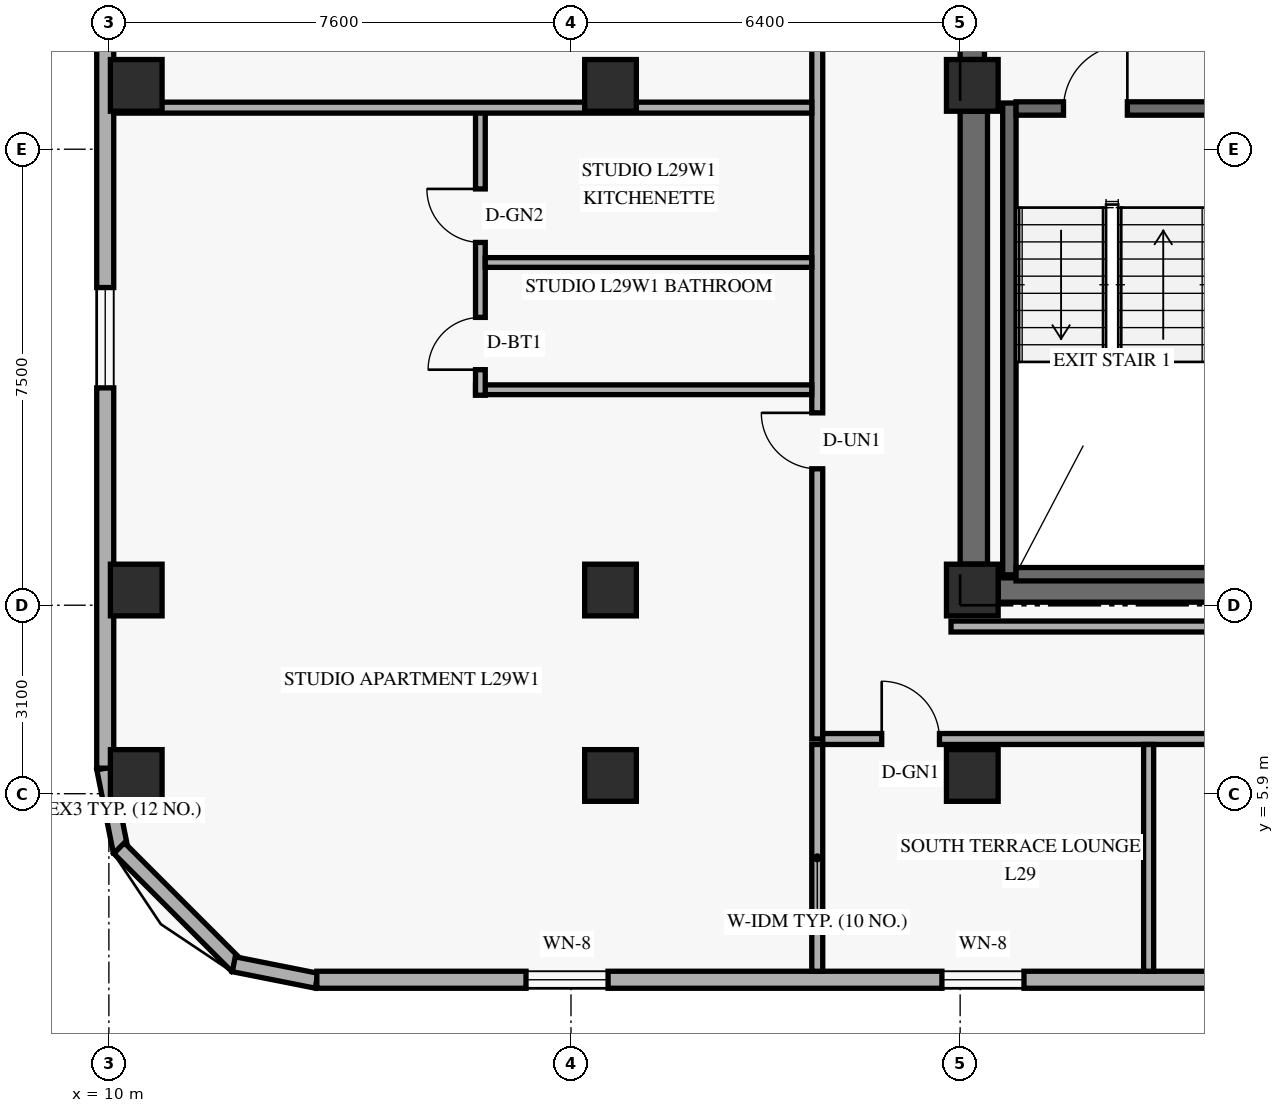
"""IFC4 building model, lengths in metres.
Left out: names, types, materials, properties, quantities, classifications, styles, units other than length and angle.
Written with IfcOpenShell. Run it as: python <this file> out.ifc"""

import sys

from ifc_helpers import new_model, si_unit, direction, frame, frame_2d, origin, origin_2d, place, context, subcontext, project, spatial, rectangle, extrude, element, fill, save


model = new_model("IFC4")
c1 = context("Model", 3, precision=1e-05, world=origin(), true_north=direction((0.0, 1.0)))
c2 = subcontext(c1, "Body", "Model", "MODEL_VIEW")
j1 = project(units=[si_unit("LENGTHUNIT", "METRE"), si_unit("PLANEANGLEUNIT", "RADIAN")], contexts=[c1])
p1 = place(None, origin())
s1 = spatial("IfcSite", under=j1, at=p1, CompositionType="ELEMENT")
p2 = place(p1, origin())
s2 = spatial("IfcBuilding", under=s1, at=p2, CompositionType="ELEMENT")
p3 = place(p2, frame((0.0, 0.0, 113.4)))
s3 = spatial("IfcBuildingStorey", under=s2, at=p3, CompositionType="ELEMENT", Elevation=113.4)
p4 = place(p3, frame((24.225, 9.675, 0.0), z_axis=(0.0, 0.0, 1.0), x_axis=(0.0, 1.0, 0.0)))
e1 = element("IfcWall", 1, at=p4, inside=s3, PredefinedType="SHEAR", context=c2, shape_type="SweptSolid", body=[
    extrude(rectangle(XDim=7.45, YDim=0.45, at=frame_2d((3.725, 0.0))), origin(), (0.0, 0.0, 1.0), 2.739),
])
p5 = place(p3, frame((24.2, 17.975, 0.0), z_axis=(0.0, 0.0, 1.0), x_axis=(0.0, 1.0, 0.0)))
e2 = element("IfcWall", 2, at=p5, inside=s3, PredefinedType="SHEAR", context=c2, shape_type="SweptSolid", body=[
    extrude(rectangle(XDim=11.8, YDim=0.4, at=frame_2d((5.9, 0.0))), origin(), (0.0, 0.0, 1.0), 2.739),
])
p6 = place(p3, frame((24.625, 9.25, 0.0), z_axis=(0.0, 0.0, 1.0), x_axis=(1.0, 0.0, 0.0)))
e3 = element("IfcWall", 3, at=p6, inside=s3, PredefinedType="SHEAR", context=c2, shape_type="SweptSolid", body=[
    extrude(rectangle(XDim=10.15, YDim=0.4, at=frame_2d((5.075, 0.0))), origin(), (0.0, 0.0, 1.0), 3.35),
])
p7 = place(p6, frame((5.2, 0.0, 0.0)))
e4 = element("IfcOpeningElement", 4, at=p7, cuts=e3, PredefinedType="OPENING", context=c2, shape_type="SweptSolid", body=[
    extrude(rectangle(XDim=1.05, YDim=2.15, at=frame_2d((0.525, 1.075))), frame((0.0, 0.21, 0.0), z_axis=(0.0, -1.0, 0.0), x_axis=(1.0, 0.0, 0.0)), (0.0, 0.0, 1.0), 0.42),
])
p8 = place(p3, frame((24.81, 9.5, 0.0), z_axis=(0.0, 0.0, 1.0), x_axis=(0.0, 1.0, 0.0)))
e5 = element("IfcWall", 5, at=p8, inside=s3, PredefinedType="SHEAR", context=c2, shape_type="SweptSolid", body=[
    extrude(rectangle(XDim=7.76, YDim=0.22, at=frame_2d((3.88, 0.0))), origin(), (0.0, 0.0, 1.0), 3.35),
])
p9 = place(p3, frame((24.92, 9.51, 0.0), z_axis=(0.0, 0.0, 1.0), x_axis=(1.0, 0.0, 0.0)))
e6 = element("IfcWall", 6, at=p9, inside=s3, PredefinedType="SHEAR", context=c2, shape_type="SweptSolid", body=[
    extrude(rectangle(XDim=3.16, YDim=0.22, at=frame_2d((1.58, 0.0))), origin(), (0.0, 0.0, 1.0), 3.35),
])
p10 = place(p3, frame((24.92, 17.17, 0.0), z_axis=(0.0, 0.0, 1.0), x_axis=(1.0, 0.0, 0.0)))
e7 = element("IfcWall", 7, at=p10, inside=s3, PredefinedType="SHEAR", context=c2, shape_type="SweptSolid", body=[
    extrude(rectangle(XDim=3.16, YDim=0.22, at=frame_2d((1.58, 0.0))), origin(), (0.0, 0.0, 1.0), 3.35),
])
p11 = place(p10, frame((0.78, 0.0, 0.0)))
e8 = element("IfcOpeningElement", 8, at=p11, cuts=e7, PredefinedType="OPENING", context=c2, shape_type="SweptSolid", body=[
    extrude(rectangle(XDim=1.05, YDim=2.15, at=frame_2d((0.525, 1.075))), frame((0.0, 0.12, 0.0), z_axis=(0.0, -1.0, 0.0), x_axis=(1.0, 0.0, 0.0)), (0.0, 0.0, 1.0), 0.24),
])
for number, where, z_axis, x_axis in (
    (9, (10.45, 6.2, 0.0), (0.0, 0.0, 1.0), (1.0, 0.0, 0.0)),
    (10, (10.45, 9.25, 0.0), (0.0, 0.0, 1.0), (1.0, 0.0, 0.0)),
    (11, (10.45, 17.55, 0.0), (0.0, 0.0, 1.0), (1.0, 0.0, 0.0)),
    (12, (18.25, 6.2, 0.0), (0.0, 0.0, 1.0), (1.0, 0.0, 0.0)),
    (13, (18.25, 9.25, 0.0), (0.0, 0.0, 1.0), (1.0, 0.0, 0.0)),
    (14, (18.25, 17.55, 0.0), (0.0, 0.0, 1.0), (1.0, 0.0, 0.0)),
    (15, (24.2, 6.2, 0.0), (0.0, 0.0, 1.0), (1.0, 0.0, 0.0)),
    (16, (24.2, 9.25, 0.0), (0.0, 0.0, 1.0), (1.0, 0.0, 0.0)),
    (17, (24.2, 17.55, 0.0), (0.0, 0.0, 1.0), (1.0, 0.0, 0.0)),
):
    element("IfcColumn", number, at=place(p3, frame(where, z_axis=z_axis, x_axis=x_axis)), inside=s3, PredefinedType="COLUMN", context=c2, shape_type="SweptSolid", body=[
        extrude(rectangle(XDim=0.85, YDim=0.85, at=origin_2d()), origin(), (0.0, 0.0, 1.0), 3.6),
    ])
p12 = place(p3, frame((9.924, 6.316, 0.0), z_axis=(0.0, 0.0, 1.0), x_axis=(0.195000137217, -0.980803214965, 0.0)))
e18 = element("IfcWall", 18, at=p12, inside=s3, PredefinedType="SOLIDWALL", context=c2, shape_type="SweptSolid", body=[
    extrude(rectangle(XDim=1.388, YDim=0.25, at=frame_2d((0.694, 0.0))), origin(), (0.0, 0.0, 1.0), 3.35),
])
p13 = place(p3, frame((10.168, 5.005, 0.0), z_axis=(0.0, 0.0, 1.0), x_axis=(0.707151344399, -0.707062215165, 0.0)))
e19 = element("IfcWall", 19, at=p13, inside=s3, PredefinedType="SOLIDWALL", context=c2, shape_type="SweptSolid", body=[
    extrude(rectangle(XDim=2.739, YDim=0.25, at=frame_2d((1.37, 0.0))), origin(), (0.0, 0.0, 1.0), 3.35),
])
p14 = place(p3, frame((12.054, 3.095, 0.0), z_axis=(0.0, 0.0, 1.0), x_axis=(0.980809899341, -0.19496651342, 0.0)))
e20 = element("IfcWall", 20, at=p14, inside=s3, PredefinedType="SOLIDWALL", context=c2, shape_type="SweptSolid", body=[
    extrude(rectangle(XDim=1.389, YDim=0.25, at=frame_2d((0.694, 0.0))), origin(), (0.0, 0.0, 1.0), 3.35),
])
p15 = place(p3, frame((13.42, 2.84, 0.0), z_axis=(0.0, 0.0, 1.0), x_axis=(1.0, 0.0, 0.0)))
e21 = element("IfcWall", 21, at=p15, inside=s3, PredefinedType="SOLIDWALL", context=c2, shape_type="SweptSolid", body=[
    extrude(rectangle(XDim=36.56, YDim=0.28, at=frame_2d((18.28, 0.0))), origin(), (0.0, 0.0, 1.0), 3.35),
])
p16 = place(p15, frame((3.44, 0.0, 0.85)))
e22 = element("IfcOpeningElement", 22, at=p16, cuts=e21, PredefinedType="OPENING", context=c2, shape_type="SweptSolid", body=[
    extrude(rectangle(XDim=1.35, YDim=1.55, at=frame_2d((0.675, 0.775))), frame((0.0, 0.15, 0.0), z_axis=(0.0, -1.0, 0.0), x_axis=(1.0, 0.0, 0.0)), (0.0, 0.0, 1.0), 0.3),
])
p17 = place(p15, frame((10.28, 0.0, 0.85)))
e23 = element("IfcOpeningElement", 23, at=p17, cuts=e21, PredefinedType="OPENING", context=c2, shape_type="SweptSolid", body=[
    extrude(rectangle(XDim=1.35, YDim=1.55, at=frame_2d((0.675, 0.775))), frame((0.0, 0.15, 0.0), z_axis=(0.0, -1.0, 0.0), x_axis=(1.0, 0.0, 0.0)), (0.0, 0.0, 1.0), 0.3),
])
p18 = place(p15, frame((17.165, 0.0, 0.85)))
e24 = element("IfcOpeningElement", 24, at=p18, cuts=e21, PredefinedType="OPENING", context=c2, shape_type="SweptSolid", body=[
    extrude(rectangle(XDim=1.35, YDim=1.55, at=frame_2d((0.675, 0.775))), frame((0.0, 0.15, 0.0), z_axis=(0.0, -1.0, 0.0), x_axis=(1.0, 0.0, 0.0)), (0.0, 0.0, 1.0), 0.3),
])
p19 = place(p15, frame((22.59, 0.0, 0.85)))
e25 = element("IfcOpeningElement", 25, at=p19, cuts=e21, PredefinedType="OPENING", context=c2, shape_type="SweptSolid", body=[
    extrude(rectangle(XDim=1.35, YDim=1.55, at=frame_2d((0.675, 0.775))), frame((0.0, 0.15, 0.0), z_axis=(0.0, -1.0, 0.0), x_axis=(1.0, 0.0, 0.0)), (0.0, 0.0, 1.0), 0.3),
])
p20 = place(p15, frame((27.68, 0.0, 0.85)))
e26 = element("IfcOpeningElement", 26, at=p20, cuts=e21, PredefinedType="OPENING", context=c2, shape_type="SweptSolid", body=[
    extrude(rectangle(XDim=1.35, YDim=1.55, at=frame_2d((0.675, 0.775))), frame((0.0, 0.15, 0.0), z_axis=(0.0, -1.0, 0.0), x_axis=(1.0, 0.0, 0.0)), (0.0, 0.0, 1.0), 0.3),
])
p21 = place(p15, frame((32.48, 0.0, 0.85)))
e27 = element("IfcOpeningElement", 27, at=p21, cuts=e21, PredefinedType="OPENING", context=c2, shape_type="SweptSolid", body=[
    extrude(rectangle(XDim=1.2, YDim=1.5, at=frame_2d((0.6, 0.75))), frame((0.0, 0.15, 0.0), z_axis=(0.0, -1.0, 0.0), x_axis=(1.0, 0.0, 0.0)), (0.0, 0.0, 1.0), 0.3),
])
p22 = place(p15, frame((34.595, 0.0, 0.85)))
e28 = element("IfcOpeningElement", 28, at=p22, cuts=e21, PredefinedType="OPENING", context=c2, shape_type="SweptSolid", body=[
    extrude(rectangle(XDim=1.35, YDim=1.55, at=frame_2d((0.675, 0.775))), frame((0.0, 0.15, 0.0), z_axis=(0.0, -1.0, 0.0), x_axis=(1.0, 0.0, 0.0)), (0.0, 0.0, 1.0), 0.3),
])
p23 = place(p3, frame((9.94, 41.68, 0.0), z_axis=(0.0, 0.0, 1.0), x_axis=(0.0, -1.0, 0.0)))
e29 = element("IfcWall", 29, at=p23, inside=s3, PredefinedType="SOLIDWALL", context=c2, shape_type="SweptSolid", body=[
    extrude(rectangle(XDim=35.36, YDim=0.28, at=frame_2d((17.68, 0.0))), origin(), (0.0, 0.0, 1.0), 3.35),
])
p24 = place(p23, frame((27.455, 0.0, 0.85)))
e30 = element("IfcOpeningElement", 30, at=p24, cuts=e29, PredefinedType="OPENING", context=c2, shape_type="SweptSolid", body=[
    extrude(rectangle(XDim=1.65, YDim=1.6, at=frame_2d((0.825, 0.8))), frame((0.0, 0.15, 0.0), z_axis=(0.0, -1.0, 0.0), x_axis=(1.0, 0.0, 0.0)), (0.0, 0.0, 1.0), 0.3),
])
p25 = place(p23, frame((21.286, 0.0, 0.85)))
e31 = element("IfcOpeningElement", 31, at=p25, cuts=e29, PredefinedType="OPENING", context=c2, shape_type="SweptSolid", body=[
    extrude(rectangle(XDim=1.65, YDim=1.6, at=frame_2d((0.825, 0.8))), frame((0.0, 0.15, 0.0), z_axis=(0.0, -1.0, 0.0), x_axis=(1.0, 0.0, 0.0)), (0.0, 0.0, 1.0), 0.3),
])
p26 = place(p23, frame((16.267, 0.0, 0.85)))
e32 = element("IfcOpeningElement", 32, at=p26, cuts=e29, PredefinedType="OPENING", context=c2, shape_type="SweptSolid", body=[
    extrude(rectangle(XDim=1.65, YDim=1.6, at=frame_2d((0.825, 0.8))), frame((0.0, 0.15, 0.0), z_axis=(0.0, -1.0, 0.0), x_axis=(1.0, 0.0, 0.0)), (0.0, 0.0, 1.0), 0.3),
])
p27 = place(p23, frame((12.186, 0.0, 0.85)))
e33 = element("IfcOpeningElement", 33, at=p27, cuts=e29, PredefinedType="OPENING", context=c2, shape_type="SweptSolid", body=[
    extrude(rectangle(XDim=1.2, YDim=1.5, at=frame_2d((0.6, 0.75))), frame((0.0, 0.15, 0.0), z_axis=(0.0, -1.0, 0.0), x_axis=(1.0, 0.0, 0.0)), (0.0, 0.0, 1.0), 0.3),
])
p28 = place(p23, frame((6.242, 0.0, 0.85)))
e34 = element("IfcOpeningElement", 34, at=p28, cuts=e29, PredefinedType="OPENING", context=c2, shape_type="SweptSolid", body=[
    extrude(rectangle(XDim=1.65, YDim=1.6, at=frame_2d((0.825, 0.8))), frame((0.0, 0.15, 0.0), z_axis=(0.0, -1.0, 0.0), x_axis=(1.0, 0.0, 0.0)), (0.0, 0.0, 1.0), 0.3),
])
p29 = place(p23, frame((0.58, 0.0, 0.85)))
e35 = element("IfcOpeningElement", 35, at=p29, cuts=e29, PredefinedType="OPENING", context=c2, shape_type="SweptSolid", body=[
    extrude(rectangle(XDim=1.65, YDim=1.6, at=frame_2d((0.825, 0.8))), frame((0.0, 0.15, 0.0), z_axis=(0.0, -1.0, 0.0), x_axis=(1.0, 0.0, 0.0)), (0.0, 0.0, 1.0), 0.3),
])
p30 = place(p3, frame((21.65, 6.8, 0.0), z_axis=(0.0, 0.0, 1.0), x_axis=(0.0, 1.0, 0.0)))
e36 = element("IfcWall", 36, at=p30, inside=s3, PredefinedType="STANDARD", context=c2, shape_type="SweptSolid", body=[
    extrude(rectangle(XDim=34.4, YDim=0.18, at=frame_2d((17.2, 0.0))), origin(), (0.0, 0.0, 1.0), 2.721),
])
p31 = place(p30, frame((4.444, 0.0, 0.0)))
e37 = element("IfcOpeningElement", 37, at=p31, cuts=e36, PredefinedType="OPENING", context=c2, shape_type="SweptSolid", body=[
    extrude(rectangle(XDim=0.92, YDim=2.15, at=frame_2d((0.46, 1.075))), frame((0.0, 0.1, 0.0), z_axis=(0.0, -1.0, 0.0), x_axis=(1.0, 0.0, 0.0)), (0.0, 0.0, 1.0), 0.2),
])
p32 = place(p30, frame((15.192, 0.0, 0.0)))
e38 = element("IfcOpeningElement", 38, at=p32, cuts=e36, PredefinedType="OPENING", context=c2, shape_type="SweptSolid", body=[
    extrude(rectangle(XDim=0.92, YDim=2.15, at=frame_2d((0.46, 1.075))), frame((0.0, 0.1, 0.0), z_axis=(0.0, -1.0, 0.0), x_axis=(1.0, 0.0, 0.0)), (0.0, 0.0, 1.0), 0.2),
])
p33 = place(p30, frame((29.868, 0.0, 0.0)))
e39 = element("IfcOpeningElement", 39, at=p33, cuts=e36, PredefinedType="OPENING", context=c2, shape_type="SweptSolid", body=[
    extrude(rectangle(XDim=0.92, YDim=2.15, at=frame_2d((0.46, 1.075))), frame((0.0, 0.1, 0.0), z_axis=(0.0, -1.0, 0.0), x_axis=(1.0, 0.0, 0.0)), (0.0, 0.0, 1.0), 0.2),
])
p34 = place(p3, frame((21.74, 6.8, 0.0), z_axis=(0.0, 0.0, 1.0), x_axis=(1.0, 0.0, 0.0)))
e40 = element("IfcWall", 40, at=p34, inside=s3, PredefinedType="STANDARD", context=c2, shape_type="SweptSolid", body=[
    extrude(rectangle(XDim=13.68, YDim=0.18, at=frame_2d((6.84, 0.0))), origin(), (0.0, 0.0, 1.0), 2.721),
])
p35 = place(p34, frame((0.97, 0.0, 0.0)))
e41 = element("IfcOpeningElement", 41, at=p35, cuts=e40, PredefinedType="OPENING", context=c2, shape_type="SweptSolid", body=[
    extrude(rectangle(XDim=0.95, YDim=2.15, at=frame_2d((0.475, 1.075))), frame((0.0, 0.1, 0.0), z_axis=(0.0, -1.0, 0.0), x_axis=(1.0, 0.0, 0.0)), (0.0, 0.0, 1.0), 0.2),
])
p36 = place(p34, frame((9.11, 0.0, 0.0)))
e42 = element("IfcOpeningElement", 42, at=p36, cuts=e40, PredefinedType="OPENING", context=c2, shape_type="SweptSolid", body=[
    extrude(rectangle(XDim=0.95, YDim=2.15, at=frame_2d((0.475, 1.075))), frame((0.0, 0.1, 0.0), z_axis=(0.0, -1.0, 0.0), x_axis=(1.0, 0.0, 0.0)), (0.0, 0.0, 1.0), 0.2),
])
p37 = place(p3, frame((23.85, 8.65, 0.0), z_axis=(0.0, 0.0, 1.0), x_axis=(1.0, 0.0, 0.0)))
e43 = element("IfcWall", 43, at=p37, inside=s3, PredefinedType="STANDARD", context=c2, shape_type="SweptSolid", body=[
    extrude(rectangle(XDim=11.57, YDim=0.18, at=frame_2d((5.785, 0.0))), origin(), (0.0, 0.0, 1.0), 2.721),
])
p38 = place(p3, frame((21.65, 2.98, 0.0), z_axis=(0.0, 0.0, 1.0), x_axis=(0.0, 1.0, 0.0)))
e44 = element("IfcWall", 44, at=p38, inside=s3, PredefinedType="PARTITIONING", context=c2, shape_type="SweptSolid", body=[
    extrude(rectangle(XDim=3.73, YDim=0.18, at=frame_2d((1.865, 0.0))), origin(), (0.0, 0.0, 1.0), 2.799),
])
p39 = place(p3, frame((16.03, 12.544, 0.0), z_axis=(0.0, 0.0, 1.0), x_axis=(1.0, 0.0, 0.0)))
e45 = element("IfcWall", 45, at=p39, inside=s3, PredefinedType="PLUMBINGWALL", context=c2, shape_type="SweptSolid", body=[
    extrude(rectangle(XDim=5.53, YDim=0.16, at=frame_2d((2.765, 0.0))), origin(), (0.0, 0.0, 1.0), 2.721),
])
p40 = place(p3, frame((16.11, 12.454, 0.0), z_axis=(0.0, 0.0, 1.0), x_axis=(0.0, 1.0, 0.0)))
e46 = element("IfcWall", 46, at=p40, inside=s3, PredefinedType="PLUMBINGWALL", context=c2, shape_type="SweptSolid", body=[
    extrude(rectangle(XDim=4.73, YDim=0.16, at=frame_2d((2.365, 0.0))), origin(), (0.0, 0.0, 1.0), 2.978),
])
p41 = place(p40, frame((0.42, 0.0, 0.0)))
e47 = element("IfcOpeningElement", 47, at=p41, cuts=e46, PredefinedType="OPENING", context=c2, shape_type="SweptSolid", body=[
    extrude(rectangle(XDim=0.86, YDim=2.12, at=frame_2d((0.43, 1.06))), frame((0.0, 0.09, 0.0), z_axis=(0.0, -1.0, 0.0), x_axis=(1.0, 0.0, 0.0)), (0.0, 0.0, 1.0), 0.18),
])
p42 = place(p40, frame((2.513, 0.0, 0.0)))
e48 = element("IfcOpeningElement", 48, at=p42, cuts=e46, PredefinedType="OPENING", context=c2, shape_type="SweptSolid", body=[
    extrude(rectangle(XDim=0.88, YDim=2.12, at=frame_2d((0.44, 1.06))), frame((0.0, 0.09, 0.0), z_axis=(0.0, -1.0, 0.0), x_axis=(1.0, 0.0, 0.0)), (0.0, 0.0, 1.0), 0.18),
])
p43 = place(p3, frame((16.19, 14.637, 0.0), z_axis=(0.0, 0.0, 1.0), x_axis=(1.0, 0.0, 0.0)))
e49 = element("IfcWall", 49, at=p43, inside=s3, PredefinedType="PLUMBINGWALL", context=c2, shape_type="SweptSolid", body=[
    extrude(rectangle(XDim=5.37, YDim=0.16, at=frame_2d((2.685, 0.0))), origin(), (0.0, 0.0, 1.0), 2.721),
])
p44 = place(p3, frame((10.08, 17.184, 0.0), z_axis=(0.0, 0.0, 1.0), x_axis=(1.0, 0.0, 0.0)))
e50 = element("IfcWall", 50, at=p44, inside=s3, PredefinedType="PARTITIONING", context=c2, shape_type="SweptSolid", body=[
    extrude(rectangle(XDim=11.48, YDim=0.18, at=frame_2d((5.74, 0.0))), origin(), (0.0, 0.0, 1.0), 2.721),
])
p45 = place(p3, frame((27.1, 2.98, 0.0), z_axis=(0.0, 0.0, 1.0), x_axis=(0.0, 1.0, 0.0)))
e51 = element("IfcWall", 51, at=p45, inside=s3, PredefinedType="PARTITIONING", context=c2, shape_type="SweptSolid", body=[
    extrude(rectangle(XDim=3.73, YDim=0.165, at=frame_2d((1.865, 0.0))), origin(), (0.0, 0.0, 1.0), 2.799),
])
p46 = place(p16, origin())
e52 = element("IfcWindow", 52, at=p46, inside=s3, PartitioningType="SINGLE_PANEL", PredefinedType="WINDOW", context=c2, shape_type="SweptSolid", body=[
    extrude(rectangle(XDim=1.35, YDim=1.55, at=frame_2d((0.675, 0.775))), frame((0.0, 0.03, 0.0), z_axis=(0.0, -1.0, 0.0), x_axis=(1.0, 0.0, 0.0)), (0.0, 0.0, 1.0), 0.06),
])
fill(e22, e52)
p47 = place(p17, origin())
e53 = element("IfcWindow", 53, at=p47, inside=s3, PartitioningType="SINGLE_PANEL", PredefinedType="WINDOW", context=c2, shape_type="SweptSolid", body=[
    extrude(rectangle(XDim=1.35, YDim=1.55, at=frame_2d((0.675, 0.775))), frame((0.0, 0.03, 0.0), z_axis=(0.0, -1.0, 0.0), x_axis=(1.0, 0.0, 0.0)), (0.0, 0.0, 1.0), 0.06),
])
fill(e23, e53)
p48 = place(p24, origin())
e54 = element("IfcWindow", 54, at=p48, inside=s3, PartitioningType="SINGLE_PANEL", PredefinedType="WINDOW", context=c2, shape_type="SweptSolid", body=[
    extrude(rectangle(XDim=1.65, YDim=1.6, at=frame_2d((0.825, 0.8))), frame((0.0, 0.03, 0.0), z_axis=(0.0, -1.0, 0.0), x_axis=(1.0, 0.0, 0.0)), (0.0, 0.0, 1.0), 0.06),
])
fill(e30, e54)
p49 = place(p11, frame((1.05, 0.0, 0.0), z_axis=(0.0, 0.0, 1.0), x_axis=(-1.0, 0.0, 0.0)))
e55 = element("IfcDoor", 55, at=p49, inside=s3, OperationType="SINGLE_SWING_LEFT", PredefinedType="DOOR", context=c2, shape_type="SweptSolid", body=[
    extrude(rectangle(XDim=1.05, YDim=2.15, at=frame_2d((0.525, 1.075))), frame((0.0, 0.025, 0.0), z_axis=(0.0, -1.0, 0.0), x_axis=(1.0, 0.0, 0.0)), (0.0, 0.0, 1.0), 0.05),
])
fill(e8, e55)
p50 = place(p31, origin())
e56 = element("IfcDoor", 56, at=p50, inside=s3, OperationType="SINGLE_SWING_RIGHT", PredefinedType="DOOR", context=c2, shape_type="SweptSolid", body=[
    extrude(rectangle(XDim=0.92, YDim=2.15, at=frame_2d((0.46, 1.075))), frame((0.0, 0.025, 0.0), z_axis=(0.0, -1.0, 0.0), x_axis=(1.0, 0.0, 0.0)), (0.0, 0.0, 1.0), 0.05),
])
fill(e37, e56)
p51 = place(p41, origin())
e57 = element("IfcDoor", 57, at=p51, inside=s3, OperationType="SINGLE_SWING_LEFT", PredefinedType="DOOR", context=c2, shape_type="SweptSolid", body=[
    extrude(rectangle(XDim=0.86, YDim=2.12, at=frame_2d((0.43, 1.06))), frame((0.0, 0.025, 0.0), z_axis=(0.0, -1.0, 0.0), x_axis=(1.0, 0.0, 0.0)), (0.0, 0.0, 1.0), 0.05),
])
fill(e47, e57)
p52 = place(p42, origin())
e58 = element("IfcDoor", 58, at=p52, inside=s3, OperationType="SINGLE_SWING_RIGHT", PredefinedType="DOOR", context=c2, shape_type="SweptSolid", body=[
    extrude(rectangle(XDim=0.88, YDim=2.12, at=frame_2d((0.44, 1.06))), frame((0.0, 0.025, 0.0), z_axis=(0.0, -1.0, 0.0), x_axis=(1.0, 0.0, 0.0)), (0.0, 0.0, 1.0), 0.05),
])
fill(e48, e58)
p53 = place(p35, origin())
e59 = element("IfcDoor", 59, at=p53, inside=s3, OperationType="SINGLE_SWING_LEFT", PredefinedType="DOOR", context=c2, shape_type="SweptSolid", body=[
    extrude(rectangle(XDim=0.95, YDim=2.15, at=frame_2d((0.475, 1.075))), frame((0.0, 0.025, 0.0), z_axis=(0.0, -1.0, 0.0), x_axis=(1.0, 0.0, 0.0)), (0.0, 0.0, 1.0), 0.05),
])
fill(e41, e59)
save(model, sys.argv[1])
